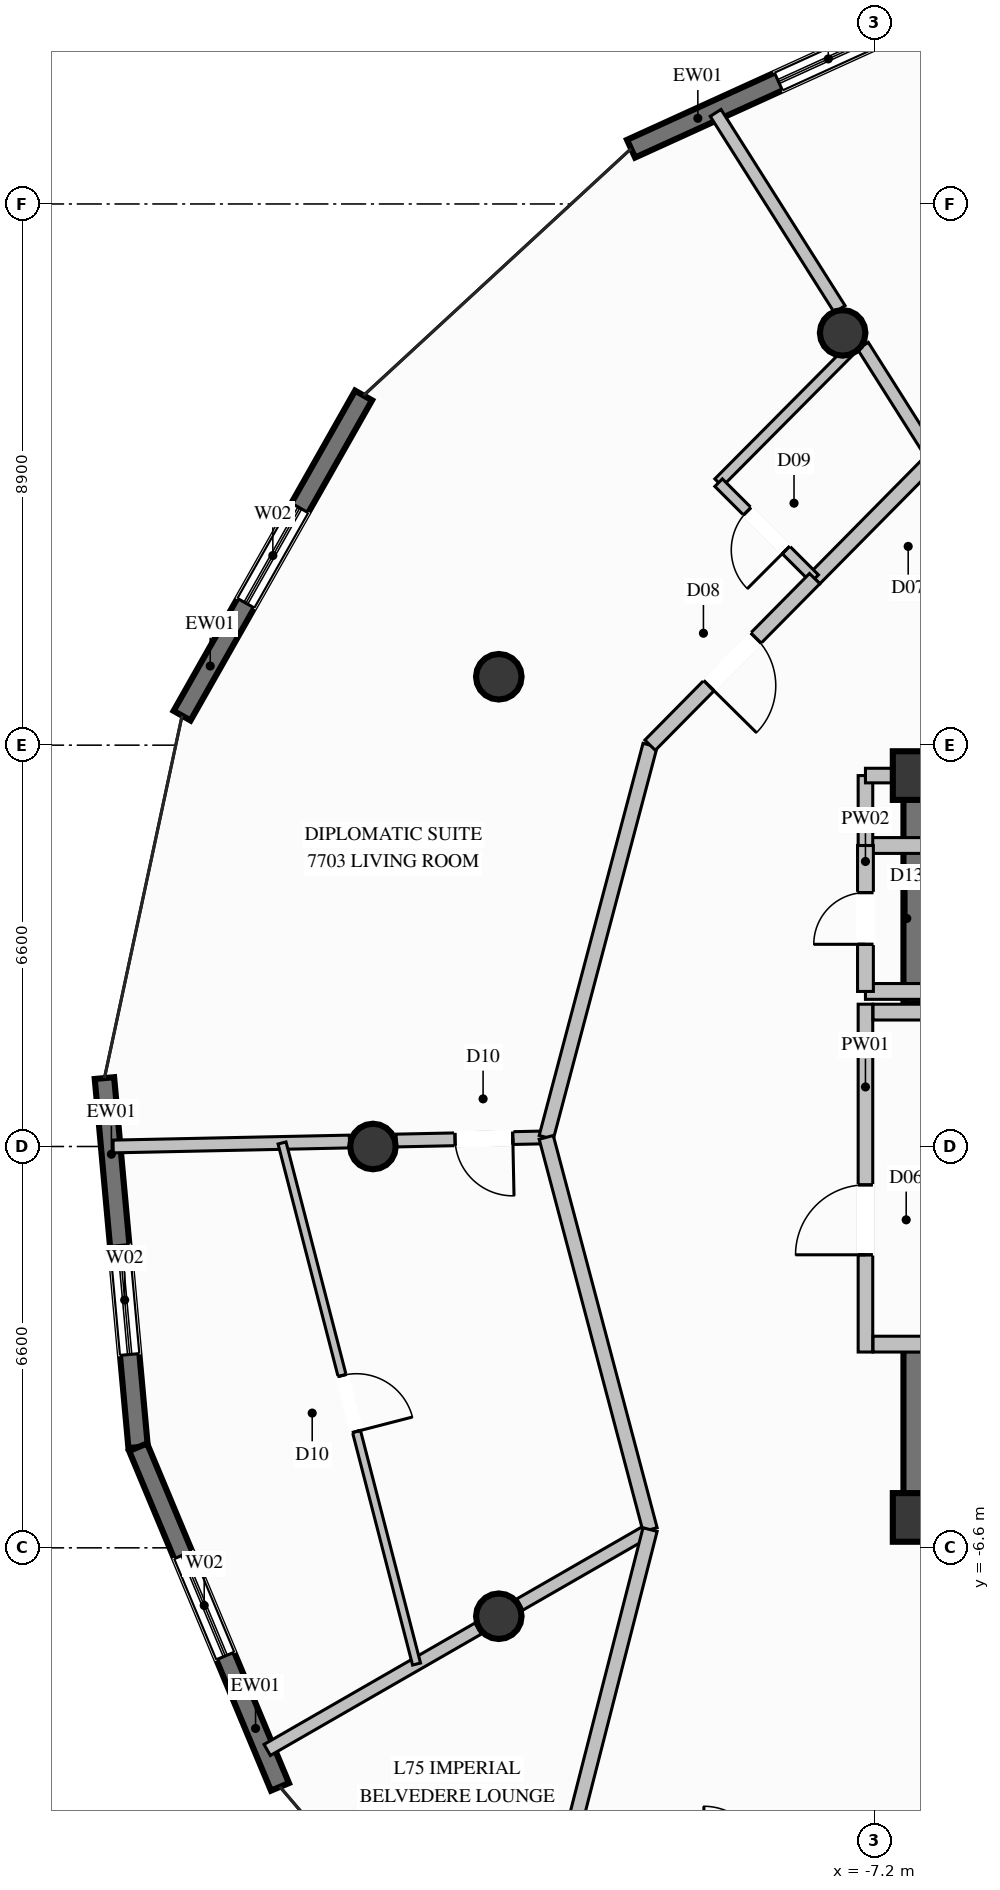
"""IFC4 building model, lengths in metres.
Left out: names, types, materials, properties, quantities, classifications, styles, units other than length and angle.
Written with IfcOpenShell. Run it as: python <this file> out.ifc"""

import sys

from ifc_helpers import new_model, si_unit, direction, frame, frame_2d, origin, origin_2d, place, context, subcontext, project, spatial, rectangle, circle, extrude, element, fill, save


model = new_model("IFC4")
c1 = context("Model", 3, precision=1e-05, world=origin(), true_north=direction((0.0, 1.0)))
c2 = subcontext(c1, "Body", "Model", "MODEL_VIEW")
j1 = project(units=[si_unit("LENGTHUNIT", "METRE"), si_unit("PLANEANGLEUNIT", "RADIAN")], contexts=[c1])
p1 = place(None, origin())
s1 = spatial("IfcSite", under=j1, at=p1, CompositionType="ELEMENT")
p2 = place(p1, origin())
s2 = spatial("IfcBuilding", under=s1, at=p2, CompositionType="ELEMENT")
p3 = place(p2, frame((0.0, 0.0, 289.6)))
s3 = spatial("IfcBuildingStorey", under=s2, at=p3, CompositionType="ELEMENT", Elevation=289.6)
for number, where, z_axis, x_axis in (
    (1, (-6.5, -6.1, 0.0), (0.0, 0.0, 1.0), (1.0, 0.0, 0.0)),
    (2, (-6.5, 6.1, 0.0), (0.0, 0.0, 1.0), (1.0, 0.0, 0.0)),
):
    element("IfcColumn", number, at=place(p3, frame(where, z_axis=z_axis, x_axis=x_axis)), inside=s3, PredefinedType="COLUMN", context=c2, shape_type="SweptSolid", body=[
        extrude(rectangle(XDim=0.8, YDim=0.8, at=origin_2d()), origin(), (0.0, 0.0, 1.0), 3.8),
    ])
p4 = place(p3, frame((-6.5, 2.35, 0.0), z_axis=(0.0, 0.0, 1.0), x_axis=(0.0, 1.0, 0.0)))
e3 = element("IfcWall", 3, at=p4, inside=s3, PredefinedType="SHEAR", context=c2, shape_type="SweptSolid", body=[
    extrude(rectangle(XDim=3.975, YDim=0.45, at=frame_2d((1.987, 0.0))), origin(), (0.0, 0.0, 1.0), 3.8),
])
p5 = place(p3, frame((-6.5, -6.325, 0.0), z_axis=(0.0, 0.0, 1.0), x_axis=(0.0, 1.0, 0.0)))
e4 = element("IfcWall", 4, at=p5, inside=s3, PredefinedType="SHEAR", context=c2, shape_type="SweptSolid", body=[
    extrude(rectangle(XDim=2.975, YDim=0.45, at=frame_2d((1.487, 0.0))), origin(), (0.0, 0.0, 1.0), 3.8),
])
for number, where, z_axis, x_axis in (
    (5, (-7.725, 13.38, 0.0), (0.0, 0.0, 1.0), (1.0, 0.0, 0.0)),
    (6, (-13.38, 7.725, 0.0), (0.0, 0.0, 1.0), (1.0, 0.0, 0.0)),
    (7, (-15.45, 0.0, 0.0), (0.0, 0.0, 1.0), (1.0, 0.0, 0.0)),
    (8, (-13.38, -7.725, 0.0), (0.0, 0.0, 1.0), (1.0, 0.0, 0.0)),
):
    element("IfcColumn", number, at=place(p3, frame(where, z_axis=z_axis, x_axis=x_axis)), inside=s3, PredefinedType="COLUMN", context=c2, shape_type="SweptSolid", body=[
        extrude(circle(Radius=0.375, at=origin_2d()), origin(), (0.0, 0.0, 1.0), 3.8),
    ])
p6 = place(p3, frame((-11.205, 16.409, 0.0), z_axis=(0.0, 0.0, 1.0), x_axis=(0.910118979779, 0.414347007526, 0.0)))
e9 = element("IfcWall", 9, at=p6, inside=s3, PredefinedType="SOLIDWALL", context=c2, shape_type="SweptSolid", body=[
    extrude(rectangle(XDim=5.916, YDim=0.32, at=frame_2d((2.958, 0.0))), origin(), (0.0, 0.0, 1.0), 3.57),
])
p7 = place(p6, frame((2.664, 0.0, 0.35)))
e10 = element("IfcOpeningElement", 10, at=p7, cuts=e9, PredefinedType="OPENING", context=c2, shape_type="SweptSolid", body=[
    extrude(rectangle(XDim=1.8, YDim=2.6, at=frame_2d((0.9, 1.3))), frame((0.0, 0.17, 0.0), z_axis=(0.0, -1.0, 0.0), x_axis=(1.0, 0.0, 0.0)), (0.0, 0.0, 1.0), 0.34),
])
p8 = place(p3, frame((-18.589, 7.085, 0.0), z_axis=(0.0, 0.0, 1.0), x_axis=(0.493134681356, 0.869952979214, 0.0)))
e11 = element("IfcWall", 11, at=p8, inside=s3, PredefinedType="SOLIDWALL", context=c2, shape_type="SweptSolid", body=[
    extrude(rectangle(XDim=6.053, YDim=0.32, at=frame_2d((3.027, 0.0))), origin(), (0.0, 0.0, 1.0), 3.57),
])
p9 = place(p8, frame((2.127, 0.0, 0.35)))
e12 = element("IfcOpeningElement", 12, at=p9, cuts=e11, PredefinedType="OPENING", context=c2, shape_type="SweptSolid", body=[
    extrude(rectangle(XDim=1.8, YDim=2.6, at=frame_2d((0.9, 1.3))), frame((0.0, 0.17, 0.0), z_axis=(0.0, -1.0, 0.0), x_axis=(1.0, 0.0, 0.0)), (0.0, 0.0, 1.0), 0.34),
])
p10 = place(p3, frame((-19.312, -4.945, 0.0), z_axis=(0.0, 0.0, 1.0), x_axis=(-0.090882437135, 0.99586162825, 0.0)))
e13 = element("IfcWall", 13, at=p10, inside=s3, PredefinedType="SOLIDWALL", context=c2, shape_type="SweptSolid", body=[
    extrude(rectangle(XDim=6.095, YDim=0.32, at=frame_2d((3.048, 0.0))), origin(), (0.0, 0.0, 1.0), 3.57),
])
p11 = place(p10, frame((1.531, 0.0, 0.35)))
e14 = element("IfcOpeningElement", 14, at=p11, cuts=e13, PredefinedType="OPENING", context=c2, shape_type="SweptSolid", body=[
    extrude(rectangle(XDim=1.8, YDim=2.6, at=frame_2d((0.9, 1.3))), frame((0.0, 0.17, 0.0), z_axis=(0.0, -1.0, 0.0), x_axis=(1.0, 0.0, 0.0)), (0.0, 0.0, 1.0), 0.34),
])
p12 = place(p3, frame((-16.979, -10.531, 0.0), z_axis=(0.0, 0.0, 1.0), x_axis=(-0.385394166941, 0.922752044749, 0.0)))
e15 = element("IfcWall", 15, at=p12, inside=s3, PredefinedType="SOLIDWALL", context=c2, shape_type="SweptSolid", body=[
    extrude(rectangle(XDim=6.053, YDim=0.32, at=frame_2d((3.027, 0.0))), origin(), (0.0, 0.0, 1.0), 3.57),
])
p13 = place(p12, frame((2.333, 0.0, 0.35)))
e16 = element("IfcOpeningElement", 16, at=p13, cuts=e15, PredefinedType="OPENING", context=c2, shape_type="SweptSolid", body=[
    extrude(rectangle(XDim=1.8, YDim=2.6, at=frame_2d((0.9, 1.3))), frame((0.0, 0.17, 0.0), z_axis=(0.0, -1.0, 0.0), x_axis=(1.0, 0.0, 0.0)), (0.0, 0.0, 1.0), 0.34),
])
p14 = place(p3, frame((-7.35, -3.38, 0.0), z_axis=(0.0, 0.0, 1.0), x_axis=(0.0, 1.0, 0.0)))
e17 = element("IfcWall", 17, at=p14, inside=s3, PredefinedType="PARTITIONING", context=c2, shape_type="SweptSolid", body=[
    extrude(rectangle(XDim=5.72, YDim=0.24, at=frame_2d((2.86, 0.0))), origin(), (0.0, 0.0, 1.0), 2.655),
])
p15 = place(p14, frame((1.599, 0.0, 0.0)))
e18 = element("IfcOpeningElement", 18, at=p15, cuts=e17, PredefinedType="OPENING", context=c2, shape_type="SweptSolid", body=[
    extrude(rectangle(XDim=1.15, YDim=2.2, at=frame_2d((0.575, 1.1))), frame((0.0, 0.13, 0.0), z_axis=(0.0, -1.0, 0.0), x_axis=(1.0, 0.0, 0.0)), (0.0, 0.0, 1.0), 0.26),
])
p16 = place(p3, frame((-7.225, -3.25, 0.0), z_axis=(0.0, 0.0, 1.0), x_axis=(1.0, 0.0, 0.0)))
e19 = element("IfcWall", 19, at=p16, inside=s3, PredefinedType="PARTITIONING", context=c2, shape_type="SweptSolid", body=[
    extrude(rectangle(XDim=3.095, YDim=0.26, at=frame_2d((1.548, 0.0))), origin(), (0.0, 0.0, 1.0), 3.57),
])
p17 = place(p3, frame((-7.225, 2.21, 0.0), z_axis=(0.0, 0.0, 1.0), x_axis=(1.0, 0.0, 0.0)))
e20 = element("IfcWall", 20, at=p17, inside=s3, PredefinedType="PARTITIONING", context=c2, shape_type="SweptSolid", body=[
    extrude(rectangle(XDim=0.875, YDim=0.26, at=frame_2d((0.438, 0.0))), origin(), (0.0, 0.0, 1.0), 3.57),
])
for number, where, z_axis, x_axis in (
    (21, (-7.35, 4.95, 0.0), (0.0, 0.0, 1.0), (1.0, 0.0, 0.0)),
    (22, (-7.35, 2.55, 0.0), (0.0, 0.0, 1.0), (1.0, 0.0, 0.0)),
):
    element("IfcWall", number, at=place(p3, frame(where, z_axis=z_axis, x_axis=x_axis)), inside=s3, PredefinedType="PARTITIONING", context=c2, shape_type="SweptSolid", body=[
        extrude(rectangle(XDim=0.93, YDim=0.26, at=frame_2d((0.465, 0.0))), origin(), (0.0, 0.0, 1.0), 3.57),
    ])
p18 = place(p3, frame((-7.35, 2.55, 0.0), z_axis=(0.0, 0.0, 1.0), x_axis=(0.0, 1.0, 0.0)))
e23 = element("IfcWall", 23, at=p18, inside=s3, PredefinedType="PARTITIONING", context=c2, shape_type="SweptSolid", body=[
    extrude(rectangle(XDim=2.4, YDim=0.26, at=frame_2d((1.2, 0.0))), origin(), (0.0, 0.0, 1.0), 2.655),
])
p19 = place(p18, frame((0.775, 0.0, 0.0)))
e24 = element("IfcOpeningElement", 24, at=p19, cuts=e23, PredefinedType="OPENING", context=c2, shape_type="SweptSolid", body=[
    extrude(rectangle(XDim=0.85, YDim=2.05, at=frame_2d((0.425, 1.025))), frame((0.0, 0.14, 0.0), z_axis=(0.0, -1.0, 0.0), x_axis=(1.0, 0.0, 0.0)), (0.0, 0.0, 1.0), 0.28),
])
p20 = place(p3, frame((-7.35, 4.95, 0.0), z_axis=(0.0, 0.0, 1.0), x_axis=(0.0, 1.0, 0.0)))
e25 = element("IfcWall", 25, at=p20, inside=s3, PredefinedType="PARTITIONING", context=c2, shape_type="SweptSolid", body=[
    extrude(rectangle(XDim=1.15, YDim=0.24, at=frame_2d((0.575, 0.0))), origin(), (0.0, 0.0, 1.0), 2.655),
])
p21 = place(p3, frame((-7.35, 6.1, 0.0), z_axis=(0.0, 0.0, 1.0), x_axis=(1.0, 0.0, 0.0)))
e26 = element("IfcWall", 26, at=p21, inside=s3, PredefinedType="PARTITIONING", context=c2, shape_type="SweptSolid", body=[
    extrude(rectangle(XDim=0.85, YDim=0.24, at=frame_2d((0.425, 0.0))), origin(), (0.0, 0.0, 1.0), 3.085),
])
p22 = place(p3, frame((-6.225, 11.322, 0.0), z_axis=(0.0, 0.0, 1.0), x_axis=(-0.534363069493, 0.845255056159, 0.0)))
e27 = element("IfcWall", 27, at=p22, inside=s3, PredefinedType="PARTITIONING", context=c2, shape_type="SweptSolid", body=[
    extrude(rectangle(XDim=2.184, YDim=0.21, at=frame_2d((1.092, 0.0))), origin(), (0.0, 0.0, 1.0), 3.085),
])
p23 = place(p3, frame((-7.774, 13.772, 0.0), z_axis=(0.0, 0.0, 1.0), x_axis=(-0.534464578877, 0.845190874256, 0.0)))
e28 = element("IfcWall", 28, at=p23, inside=s3, PredefinedType="PARTITIONING", context=c2, shape_type="SweptSolid", body=[
    extrude(rectangle(XDim=3.817, YDim=0.21, at=frame_2d((1.908, 0.0))), origin(), (0.0, 0.0, 1.0), 3.57),
])
p24 = place(p3, frame((-12.6, 0.15, 0.0), z_axis=(0.0, 0.0, 1.0), x_axis=(-0.999777874808, -0.021076077527, 0.0)))
e29 = element("IfcWall", 29, at=p24, inside=s3, PredefinedType="PARTITIONING", context=c2, shape_type="SweptSolid", body=[
    extrude(rectangle(XDim=2.467, YDim=0.21, at=frame_2d((1.234, 0.0))), origin(), (0.0, 0.0, 1.0), 3.57),
])
p25 = place(p24, frame((0.55, 0.0, 0.0)))
e30 = element("IfcOpeningElement", 30, at=p25, cuts=e29, PredefinedType="OPENING", context=c2, shape_type="SweptSolid", body=[
    extrude(rectangle(XDim=0.95, YDim=2.1, at=frame_2d((0.475, 1.05))), frame((0.0, 0.115, 0.0), z_axis=(0.0, -1.0, 0.0), x_axis=(1.0, 0.0, 0.0)), (0.0, 0.0, 1.0), 0.23),
])
p26 = place(p3, frame((-15.836, 0.082, 0.0), z_axis=(0.0, 0.0, 1.0), x_axis=(-0.99977738069, -0.021099503794, 0.0)))
e31 = element("IfcWall", 31, at=p26, inside=s3, PredefinedType="PARTITIONING", context=c2, shape_type="SweptSolid", body=[
    extrude(rectangle(XDim=3.888, YDim=0.21, at=frame_2d((1.944, 0.0))), origin(), (0.0, 0.0, 1.0), 3.57),
])
p27 = place(p3, frame((-10.892, -6.3, 0.0), z_axis=(0.0, 0.0, 1.0), x_axis=(-0.866768644494, -0.498710453993, 0.0)))
e32 = element("IfcWall", 32, at=p27, inside=s3, PredefinedType="PARTITIONING", context=c2, shape_type="SweptSolid", body=[
    extrude(rectangle(XDim=2.472, YDim=0.21, at=frame_2d((1.236, 0.0))), origin(), (0.0, 0.0, 1.0), 3.085),
])
p28 = place(p3, frame((-13.719, -7.927, 0.0), z_axis=(0.0, 0.0, 1.0), x_axis=(-0.866707942238, -0.498815940865, 0.0)))
e33 = element("IfcWall", 33, at=p28, inside=s3, PredefinedType="PARTITIONING", context=c2, shape_type="SweptSolid", body=[
    extrude(rectangle(XDim=4.004, YDim=0.21, at=frame_2d((2.002, 0.0))), origin(), (0.0, 0.0, 1.0), 3.57),
])
p29 = place(p3, frame((-6.225, 11.322, 0.0), z_axis=(0.0, 0.0, 1.0), x_axis=(-0.702979205765, -0.711210402245, 0.0)))
e34 = element("IfcWall", 34, at=p29, inside=s3, PredefinedType="PARTITIONING", context=c2, shape_type="SweptSolid", body=[
    extrude(rectangle(XDim=2.788, YDim=0.24, at=frame_2d((1.394, 0.0))), origin(), (0.0, 0.0, 1.0), 3.57),
])
p30 = place(p3, frame((-7.445, 13.252, 0.0), z_axis=(0.0, 0.0, 1.0), x_axis=(-0.704803641047, -0.709402444009, 0.0)))
e35 = element("IfcWall", 35, at=p30, inside=s3, PredefinedType="PLUMBINGWALL", context=c2, shape_type="SweptSolid", body=[
    extrude(rectangle(XDim=3.292, YDim=0.175, at=frame_2d((1.646, 0.0))), origin(), (0.0, 0.0, 1.0), 3.138),
])
p31 = place(p3, frame((-8.185, 9.339, 0.0), z_axis=(0.0, 0.0, 1.0), x_axis=(-0.707544008936, 0.706669282917, 0.0)))
e36 = element("IfcWall", 36, at=p31, inside=s3, PredefinedType="PLUMBINGWALL", context=c2, shape_type="SweptSolid", body=[
    extrude(rectangle(XDim=2.233, YDim=0.175, at=frame_2d((1.116, 0.0))), origin(), (0.0, 0.0, 1.0), 3.57),
])
p32 = place(p31, frame((0.667, 0.0, 0.0)))
e37 = element("IfcOpeningElement", 37, at=p32, cuts=e36, PredefinedType="OPENING", context=c2, shape_type="SweptSolid", body=[
    extrude(rectangle(XDim=0.9, YDim=2.1, at=frame_2d((0.45, 1.05))), frame((0.0, 0.098, 0.0), z_axis=(0.0, -1.0, 0.0), x_axis=(1.0, 0.0, 0.0)), (0.0, 0.0, 1.0), 0.195),
])
p33 = place(p3, frame((-10.892, 6.6, 0.0), z_axis=(0.0, 0.0, 1.0), x_axis=(-0.255977036578, -0.966682862548, 0.0)))
e38 = element("IfcWall", 38, at=p33, inside=s3, PredefinedType="PARTITIONING", context=c2, shape_type="SweptSolid", body=[
    extrude(rectangle(XDim=6.673, YDim=0.24, at=frame_2d((3.336, 0.0))), origin(), (0.0, 0.0, 1.0), 3.57),
])
p34 = place(p3, frame((-8.185, 9.339, 0.0), z_axis=(0.0, 0.0, 1.0), x_axis=(-0.702942107486, -0.711247069254, 0.0)))
e39 = element("IfcWall", 39, at=p34, inside=s3, PredefinedType="PARTITIONING", context=c2, shape_type="SweptSolid", body=[
    extrude(rectangle(XDim=3.851, YDim=0.24, at=frame_2d((1.926, 0.0))), origin(), (0.0, 0.0, 1.0), 3.57),
])
p35 = place(p34, frame((1.375, 0.0, 0.0)))
e40 = element("IfcOpeningElement", 40, at=p35, cuts=e39, PredefinedType="OPENING", context=c2, shape_type="SweptSolid", body=[
    extrude(rectangle(XDim=1.1, YDim=2.3, at=frame_2d((0.55, 1.15))), frame((0.0, 0.13, 0.0), z_axis=(0.0, -1.0, 0.0), x_axis=(1.0, 0.0, 0.0)), (0.0, 0.0, 1.0), 0.26),
])
p36 = place(p3, frame((-12.6, 0.15, 0.0), z_axis=(0.0, 0.0, 1.0), x_axis=(0.255986090798, -0.966680464951, 0.0)))
e41 = element("IfcWall", 41, at=p36, inside=s3, PredefinedType="PARTITIONING", context=c2, shape_type="SweptSolid", body=[
    extrude(rectangle(XDim=6.672, YDim=0.24, at=frame_2d((3.336, 0.0))), origin(), (0.0, 0.0, 1.0), 3.57),
])
p37 = place(p3, frame((-16.945, 0.058, 0.0), z_axis=(0.0, 0.0, 1.0), x_axis=(0.249960615912, -0.968256004625, 0.0)))
e42 = element("IfcWall", 42, at=p37, inside=s3, PredefinedType="PARTITIONING", context=c2, shape_type="SweptSolid", body=[
    extrude(rectangle(XDim=8.85, YDim=0.135, at=frame_2d((4.425, 0.0))), origin(), (0.0, 0.0, 1.0), 3.57),
])
p38 = place(p37, frame((3.95, 0.0, 0.0)))
e43 = element("IfcOpeningElement", 43, at=p38, cuts=e42, PredefinedType="OPENING", context=c2, shape_type="SweptSolid", body=[
    extrude(rectangle(XDim=0.95, YDim=2.1, at=frame_2d((0.475, 1.05))), frame((0.0, 0.078, 0.0), z_axis=(0.0, -1.0, 0.0), x_axis=(1.0, 0.0, 0.0)), (0.0, 0.0, 1.0), 0.155),
])
p39 = place(p3, frame((-10.892, -6.3, 0.0), z_axis=(0.0, 0.0, 1.0), x_axis=(-0.247995630193, -0.968761150855, 0.0)))
e44 = element("IfcWall", 44, at=p39, inside=s3, PredefinedType="PARTITIONING", context=c2, shape_type="SweptSolid", body=[
    extrude(rectangle(XDim=5.677, YDim=0.24, at=frame_2d((2.839, 0.0))), origin(), (0.0, 0.0, 1.0), 3.57),
])
p40 = place(p7, origin())
e45 = element("IfcWindow", 45, at=p40, inside=s3, PartitioningType="SINGLE_PANEL", PredefinedType="WINDOW", context=c2, shape_type="SweptSolid", body=[
    extrude(rectangle(XDim=1.8, YDim=2.6, at=frame_2d((0.9, 1.3))), frame((0.0, 0.03, 0.0), z_axis=(0.0, -1.0, 0.0), x_axis=(1.0, 0.0, 0.0)), (0.0, 0.0, 1.0), 0.06),
])
fill(e10, e45)
p41 = place(p9, origin())
e46 = element("IfcWindow", 46, at=p41, inside=s3, PartitioningType="SINGLE_PANEL", PredefinedType="WINDOW", context=c2, shape_type="SweptSolid", body=[
    extrude(rectangle(XDim=1.8, YDim=2.6, at=frame_2d((0.9, 1.3))), frame((0.0, 0.03, 0.0), z_axis=(0.0, -1.0, 0.0), x_axis=(1.0, 0.0, 0.0)), (0.0, 0.0, 1.0), 0.06),
])
fill(e12, e46)
p42 = place(p11, origin())
e47 = element("IfcWindow", 47, at=p42, inside=s3, PartitioningType="SINGLE_PANEL", PredefinedType="WINDOW", context=c2, shape_type="SweptSolid", body=[
    extrude(rectangle(XDim=1.8, YDim=2.6, at=frame_2d((0.9, 1.3))), frame((0.0, 0.03, 0.0), z_axis=(0.0, -1.0, 0.0), x_axis=(1.0, 0.0, 0.0)), (0.0, 0.0, 1.0), 0.06),
])
fill(e14, e47)
p43 = place(p13, origin())
e48 = element("IfcWindow", 48, at=p43, inside=s3, PartitioningType="SINGLE_PANEL", PredefinedType="WINDOW", context=c2, shape_type="SweptSolid", body=[
    extrude(rectangle(XDim=1.8, YDim=2.6, at=frame_2d((0.9, 1.3))), frame((0.0, 0.03, 0.0), z_axis=(0.0, -1.0, 0.0), x_axis=(1.0, 0.0, 0.0)), (0.0, 0.0, 1.0), 0.06),
])
fill(e16, e48)
p44 = place(p15, origin())
e49 = element("IfcDoor", 49, at=p44, inside=s3, OperationType="SINGLE_SWING_LEFT", PredefinedType="DOOR", context=c2, shape_type="SweptSolid", body=[
    extrude(rectangle(XDim=1.15, YDim=2.2, at=frame_2d((0.575, 1.1))), frame((0.0, 0.025, 0.0), z_axis=(0.0, -1.0, 0.0), x_axis=(1.0, 0.0, 0.0)), (0.0, 0.0, 1.0), 0.05),
])
fill(e18, e49)
p45 = place(p19, origin())
e50 = element("IfcDoor", 50, at=p45, inside=s3, OperationType="SINGLE_SWING_LEFT", PredefinedType="DOOR", context=c2, shape_type="SweptSolid", body=[
    extrude(rectangle(XDim=0.85, YDim=2.05, at=frame_2d((0.425, 1.025))), frame((0.0, 0.025, 0.0), z_axis=(0.0, -1.0, 0.0), x_axis=(1.0, 0.0, 0.0)), (0.0, 0.0, 1.0), 0.05),
])
fill(e24, e50)
p46 = place(p32, origin())
e51 = element("IfcDoor", 51, at=p46, inside=s3, OperationType="SINGLE_SWING_LEFT", PredefinedType="DOOR", context=c2, shape_type="SweptSolid", body=[
    extrude(rectangle(XDim=0.9, YDim=2.1, at=frame_2d((0.45, 1.05))), frame((0.0, 0.025, 0.0), z_axis=(0.0, -1.0, 0.0), x_axis=(1.0, 0.0, 0.0)), (0.0, 0.0, 1.0), 0.05),
])
fill(e37, e51)
p47 = place(p35, origin())
e52 = element("IfcDoor", 52, at=p47, inside=s3, OperationType="SINGLE_SWING_RIGHT", PredefinedType="DOOR", context=c2, shape_type="SweptSolid", body=[
    extrude(rectangle(XDim=1.1, YDim=2.3, at=frame_2d((0.55, 1.15))), frame((0.0, 0.025, 0.0), z_axis=(0.0, -1.0, 0.0), x_axis=(1.0, 0.0, 0.0)), (0.0, 0.0, 1.0), 0.05),
])
fill(e40, e52)
p48 = place(p25, origin())
e53 = element("IfcDoor", 53, at=p48, inside=s3, OperationType="SINGLE_SWING_LEFT", PredefinedType="DOOR", context=c2, shape_type="SweptSolid", body=[
    extrude(rectangle(XDim=0.95, YDim=2.1, at=frame_2d((0.475, 1.05))), frame((0.0, 0.025, 0.0), z_axis=(0.0, -1.0, 0.0), x_axis=(1.0, 0.0, 0.0)), (0.0, 0.0, 1.0), 0.05),
])
fill(e30, e53)
p49 = place(p38, origin())
e54 = element("IfcDoor", 54, at=p49, inside=s3, OperationType="SINGLE_SWING_RIGHT", PredefinedType="DOOR", context=c2, shape_type="SweptSolid", body=[
    extrude(rectangle(XDim=0.95, YDim=2.1, at=frame_2d((0.475, 1.05))), frame((0.0, 0.025, 0.0), z_axis=(0.0, -1.0, 0.0), x_axis=(1.0, 0.0, 0.0)), (0.0, 0.0, 1.0), 0.05),
])
fill(e43, e54)
save(model, sys.argv[1])
